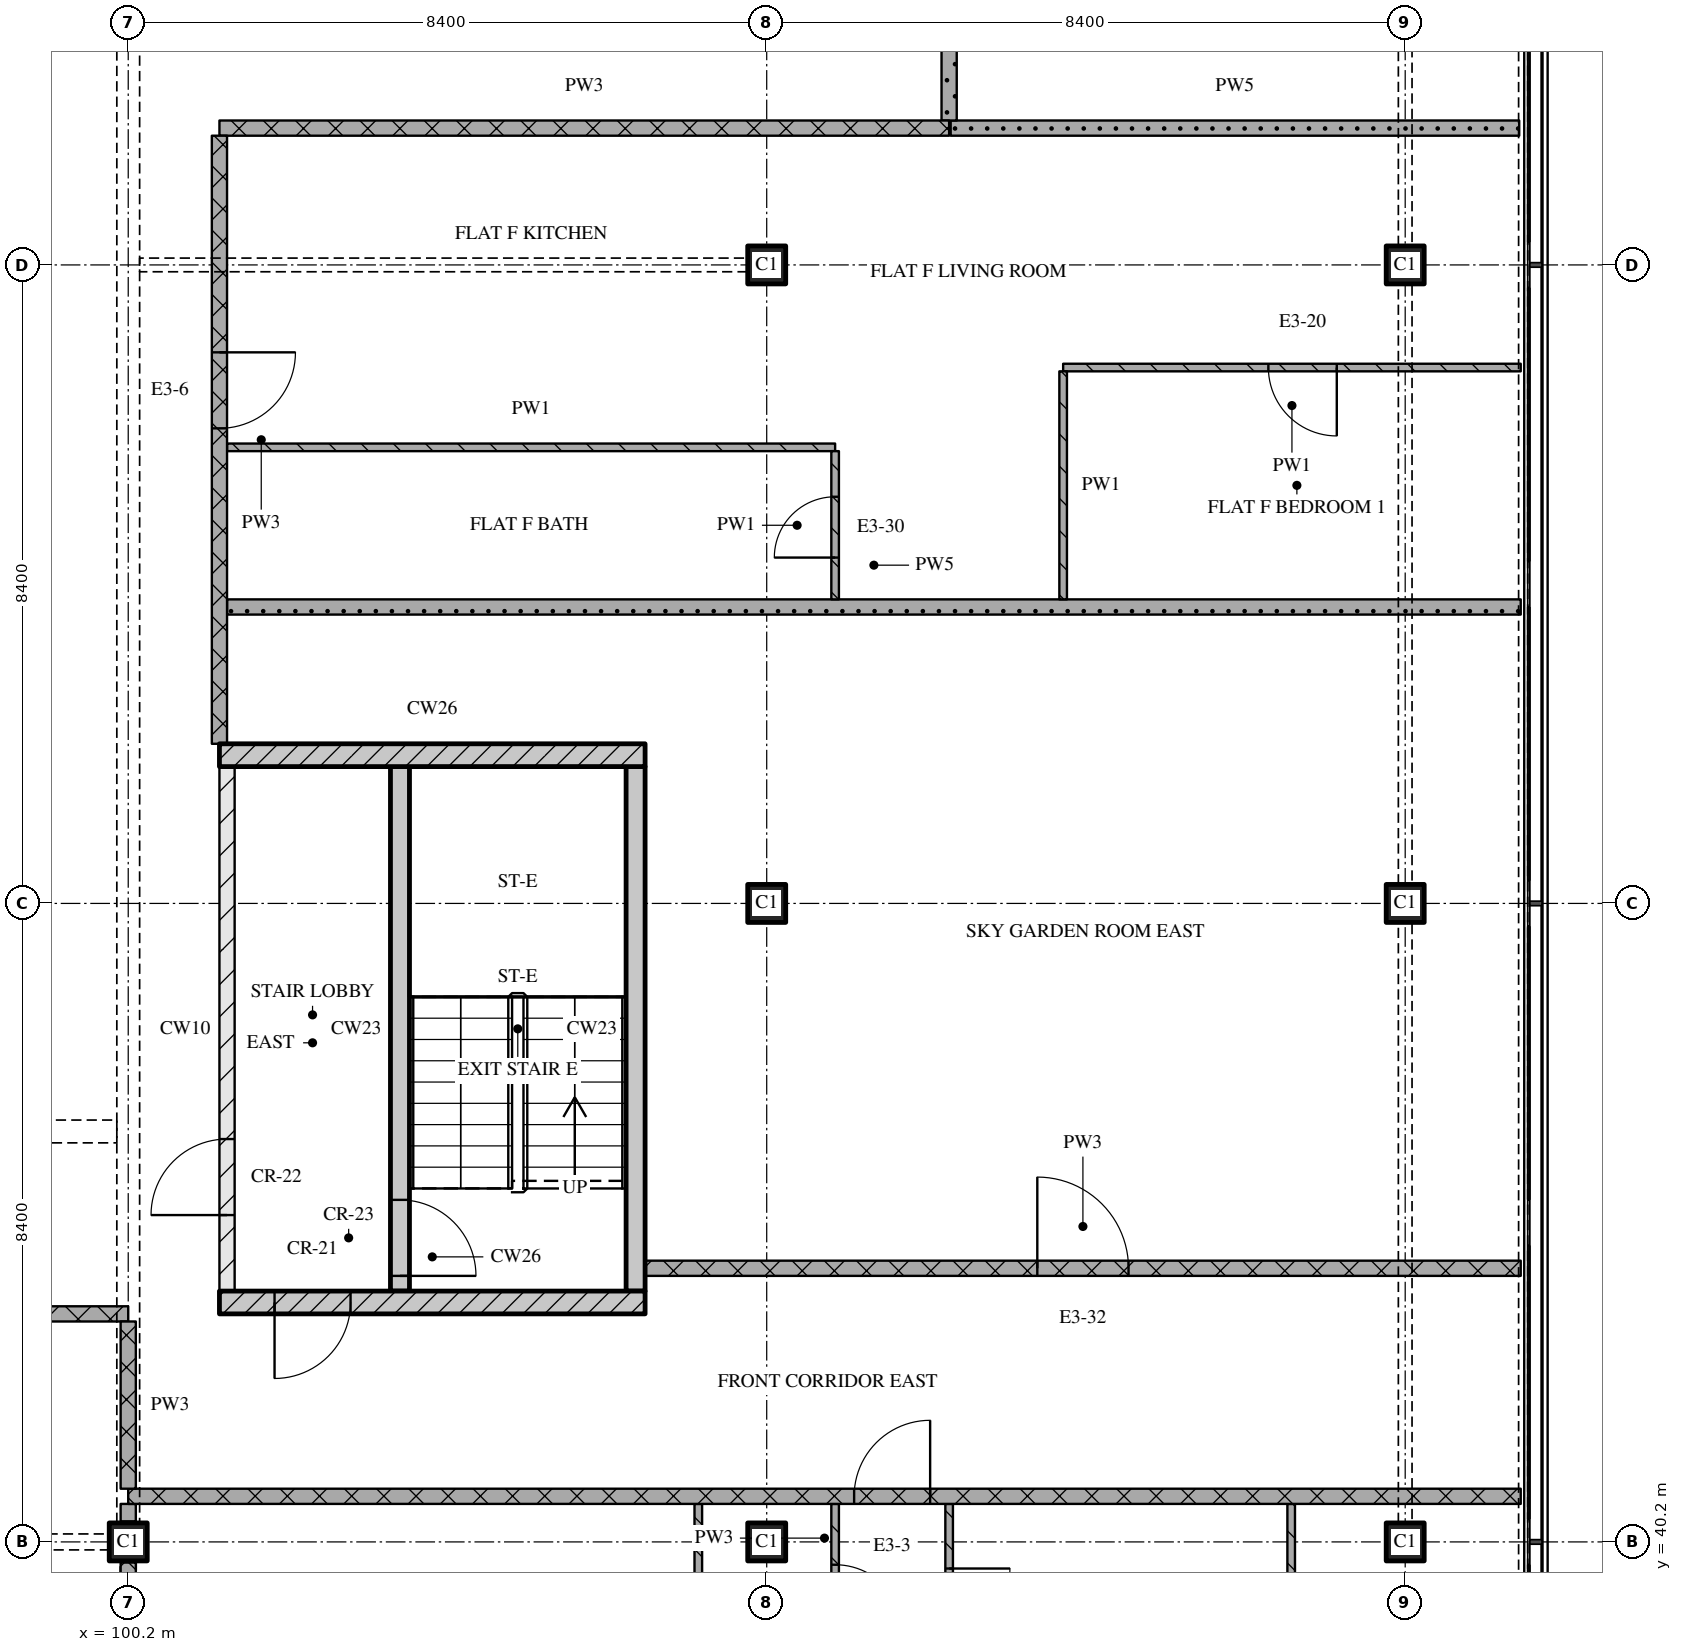
"""IFC4 building model, lengths in metres.
Left out: names, types, materials, properties, quantities, classifications, styles, units other than length and angle.
Written with IfcOpenShell. Run it as: python <this file> out.ifc"""

import sys

from ifc_helpers import new_model, si_unit, direction, frame, frame_2d, origin, origin_2d, place, context, subcontext, project, spatial, rectangle, extrude, element, fill, save


model = new_model("IFC4")
c1 = context("Model", 3, precision=1e-05, world=origin(), true_north=direction((0.0, 1.0)))
c2 = subcontext(c1, "Body", "Model", "MODEL_VIEW")
j1 = project(units=[si_unit("LENGTHUNIT", "METRE"), si_unit("PLANEANGLEUNIT", "RADIAN")], contexts=[c1])
p1 = place(None, origin())
s1 = spatial("IfcSite", under=j1, at=p1, CompositionType="ELEMENT")
p2 = place(p1, origin())
s2 = spatial("IfcBuilding", under=s1, at=p2, CompositionType="ELEMENT")
p3 = place(p2, frame((0.0, 0.0, 274.35)))
s3 = spatial("IfcBuildingStorey", under=s2, at=p3, CompositionType="ELEMENT", Elevation=274.35)
for number, where, z_axis, x_axis in (
    (1, (100.2, 40.2, 0.0), (0.0, 0.0, 1.0), (1.0, 0.0, 0.0)),
    (2, (108.6, 40.2, 0.0), (0.0, 0.0, 1.0), (1.0, 0.0, 0.0)),
    (3, (108.6, 48.6, 0.0), (0.0, 0.0, 1.0), (1.0, 0.0, 0.0)),
    (4, (108.6, 57.0, 0.0), (0.0, 0.0, 1.0), (1.0, 0.0, 0.0)),
    (5, (117.0, 40.2, 0.0), (0.0, 0.0, 1.0), (1.0, 0.0, 0.0)),
    (6, (117.0, 48.6, 0.0), (0.0, 0.0, 1.0), (1.0, 0.0, 0.0)),
    (7, (117.0, 57.0, 0.0), (0.0, 0.0, 1.0), (1.0, 0.0, 0.0)),
):
    element("IfcColumn", number, at=place(p3, frame(where, z_axis=z_axis, x_axis=x_axis)), inside=s3, PredefinedType="COLUMN", context=c2, shape_type="SweptSolid", body=[
        extrude(rectangle(XDim=0.5, YDim=0.5, at=origin_2d()), origin(), (0.0, 0.0, 1.0), 3.6),
    ])
p4 = place(p3, frame((101.4, 43.35, 0.0), z_axis=(0.0, 0.0, 1.0), x_axis=(1.0, 0.0, 0.0)))
e8 = element("IfcWall", 8, at=p4, inside=s3, PredefinedType="SOLIDWALL", context=c2, shape_type="SweptSolid", body=[
    extrude(rectangle(XDim=5.6, YDim=0.3, at=frame_2d((2.8, 0.0))), origin(), (0.0, 0.0, 1.0), 3.32),
])
p5 = place(p4, frame((0.725, 0.0, 0.0)))
e9 = element("IfcOpeningElement", 9, at=p5, cuts=e8, PredefinedType="OPENING", context=c2, shape_type="SweptSolid", body=[
    extrude(rectangle(XDim=1.0, YDim=2.1, at=frame_2d((0.5, 1.05))), frame((0.0, 0.16, 0.0), z_axis=(0.0, -1.0, 0.0), x_axis=(1.0, 0.0, 0.0)), (0.0, 0.0, 1.0), 0.32),
])
p6 = place(p3, frame((101.5, 43.5, 0.0), z_axis=(0.0, 0.0, 1.0), x_axis=(0.0, 1.0, 0.0)))
e10 = element("IfcWall", 10, at=p6, inside=s3, PredefinedType="PARTITIONING", context=c2, shape_type="SweptSolid", body=[
    extrude(rectangle(XDim=6.9, YDim=0.2, at=frame_2d((3.45, 0.0))), origin(), (0.0, 0.0, 1.0), 3.32),
])
p7 = place(p6, frame((1.0, 0.0, 0.0)))
e11 = element("IfcOpeningElement", 11, at=p7, cuts=e10, PredefinedType="OPENING", context=c2, shape_type="SweptSolid", body=[
    extrude(rectangle(XDim=1.0, YDim=2.1, at=frame_2d((0.5, 1.05))), frame((0.0, 0.11, 0.0), z_axis=(0.0, -1.0, 0.0), x_axis=(1.0, 0.0, 0.0)), (0.0, 0.0, 1.0), 0.22),
])
p8 = place(p3, frame((103.775, 43.5, 0.0), z_axis=(0.0, 0.0, 1.0), x_axis=(0.0, 1.0, 0.0)))
e12 = element("IfcWall", 12, at=p8, inside=s3, PredefinedType="SOLIDWALL", context=c2, shape_type="SweptSolid", body=[
    extrude(rectangle(XDim=6.9, YDim=0.25, at=frame_2d((3.45, 0.0))), origin(), (0.0, 0.0, 1.0), 3.32),
])
p9 = place(p8, frame((0.2, 0.0, 0.0)))
e13 = element("IfcOpeningElement", 13, at=p9, cuts=e12, PredefinedType="OPENING", context=c2, shape_type="SweptSolid", body=[
    extrude(rectangle(XDim=1.0, YDim=2.1, at=frame_2d((0.5, 1.05))), frame((0.0, 0.135, 0.0), z_axis=(0.0, -1.0, 0.0), x_axis=(1.0, 0.0, 0.0)), (0.0, 0.0, 1.0), 0.27),
])
p10 = place(p3, frame((106.875, 43.5, 0.0), z_axis=(0.0, 0.0, 1.0), x_axis=(0.0, 1.0, 0.0)))
e14 = element("IfcWall", 14, at=p10, inside=s3, PredefinedType="SOLIDWALL", context=c2, shape_type="SweptSolid", body=[
    extrude(rectangle(XDim=6.9, YDim=0.25, at=frame_2d((3.45, 0.0))), origin(), (0.0, 0.0, 1.0), 3.32),
])
p11 = place(p3, frame((101.4, 50.55, 0.0), z_axis=(0.0, 0.0, 1.0), x_axis=(1.0, 0.0, 0.0)))
e15 = element("IfcWall", 15, at=p11, inside=s3, PredefinedType="SOLIDWALL", context=c2, shape_type="SweptSolid", body=[
    extrude(rectangle(XDim=5.6, YDim=0.3, at=frame_2d((2.8, 0.0))), origin(), (0.0, 0.0, 1.0), 3.32),
])
p12 = place(p3, frame((118.52, 40.8, 0.0), z_axis=(0.0, 0.0, 1.0), x_axis=(-1.0, 0.0, 0.0)))
e16 = element("IfcWall", 16, at=p12, inside=s3, PredefinedType="PARTITIONING", context=c2, shape_type="SweptSolid", body=[
    extrude(rectangle(XDim=18.32, YDim=0.2, at=frame_2d((9.16, 0.0))), origin(), (0.0, 0.0, 1.0), 3.32),
])
p13 = place(p12, frame((7.77, 0.0, 0.0)))
e17 = element("IfcOpeningElement", 17, at=p13, cuts=e16, PredefinedType="OPENING", context=c2, shape_type="SweptSolid", body=[
    extrude(rectangle(XDim=1.0, YDim=2.1, at=frame_2d((0.5, 1.05))), frame((0.0, 0.11, 0.0), z_axis=(0.0, -1.0, 0.0), x_axis=(1.0, 0.0, 0.0)), (0.0, 0.0, 1.0), 0.22),
])
p14 = place(p3, frame((100.2, 43.2, 0.0), z_axis=(0.0, 0.0, 1.0), x_axis=(-1.0, 0.0, 0.0)))
e18 = element("IfcWall", 18, at=p14, inside=s3, PredefinedType="PARTITIONING", context=c2, shape_type="SweptSolid", body=[
    extrude(rectangle(XDim=25.2, YDim=0.2, at=frame_2d((12.6, 0.0))), origin(), (0.0, 0.0, 1.0), 3.32),
])
p15 = place(p14, frame((17.35, 0.0, 0.0)))
e19 = element("IfcOpeningElement", 19, at=p15, cuts=e18, PredefinedType="OPENING", context=c2, shape_type="SweptSolid", body=[
    extrude(rectangle(XDim=1.0, YDim=2.1, at=frame_2d((0.5, 1.05))), frame((0.0, 0.11, 0.0), z_axis=(0.0, -1.0, 0.0), x_axis=(1.0, 0.0, 0.0)), (0.0, 0.0, 1.0), 0.22),
])
p16 = place(p3, frame((107.0, 43.8, 0.0), z_axis=(0.0, 0.0, 1.0), x_axis=(1.0, 0.0, 0.0)))
e20 = element("IfcWall", 20, at=p16, inside=s3, PredefinedType="PARTITIONING", context=c2, shape_type="SweptSolid", body=[
    extrude(rectangle(XDim=11.52, YDim=0.2, at=frame_2d((5.76, 0.0))), origin(), (0.0, 0.0, 1.0), 3.32),
])
p17 = place(p16, frame((5.16, 0.0, 0.0)))
e21 = element("IfcOpeningElement", 21, at=p17, cuts=e20, PredefinedType="OPENING", context=c2, shape_type="SweptSolid", body=[
    extrude(rectangle(XDim=1.2, YDim=2.1, at=frame_2d((0.6, 1.05))), frame((0.0, 0.11, 0.0), z_axis=(0.0, -1.0, 0.0), x_axis=(1.0, 0.0, 0.0)), (0.0, 0.0, 1.0), 0.22),
])
p18 = place(p3, frame((101.5, 52.5, 0.0), z_axis=(0.0, 0.0, 1.0), x_axis=(1.0, 0.0, 0.0)))
e22 = element("IfcWall", 22, at=p18, inside=s3, PredefinedType="PARTITIONING", context=c2, shape_type="SweptSolid", body=[
    extrude(rectangle(XDim=17.02, YDim=0.2, at=frame_2d((8.51, 0.0))), origin(), (0.0, 0.0, 1.0), 3.32),
])
p19 = place(p3, frame((101.5, 54.6, 0.0), z_axis=(0.0, 0.0, 1.0), x_axis=(1.0, 0.0, 0.0)))
e23 = element("IfcWall", 23, at=p19, inside=s3, PredefinedType="PARTITIONING", context=c2, shape_type="SweptSolid", body=[
    extrude(rectangle(XDim=8.0, YDim=0.1, at=frame_2d((4.0, 0.0))), origin(), (0.0, 0.0, 1.0), 3.32),
])
p20 = place(p3, frame((118.52, 55.65, 0.0), z_axis=(0.0, 0.0, 1.0), x_axis=(-1.0, 0.0, 0.0)))
e24 = element("IfcWall", 24, at=p20, inside=s3, PredefinedType="PARTITIONING", context=c2, shape_type="SweptSolid", body=[
    extrude(rectangle(XDim=6.02, YDim=0.1, at=frame_2d((3.01, 0.0))), origin(), (0.0, 0.0, 1.0), 3.32),
])
p21 = place(p20, frame((2.42, 0.0, 0.0)))
e25 = element("IfcOpeningElement", 25, at=p21, cuts=e24, PredefinedType="OPENING", context=c2, shape_type="SweptSolid", body=[
    extrude(rectangle(XDim=0.9, YDim=2.1, at=frame_2d((0.45, 1.05))), frame((0.0, 0.06, 0.0), z_axis=(0.0, -1.0, 0.0), x_axis=(1.0, 0.0, 0.0)), (0.0, 0.0, 1.0), 0.12),
])
p22 = place(p3, frame((101.4, 58.8, 0.0), z_axis=(0.0, 0.0, 1.0), x_axis=(1.0, 0.0, 0.0)))
e26 = element("IfcWall", 26, at=p22, inside=s3, PredefinedType="PARTITIONING", context=c2, shape_type="SweptSolid", body=[
    extrude(rectangle(XDim=9.6, YDim=0.2, at=frame_2d((4.8, 0.0))), origin(), (0.0, 0.0, 1.0), 3.32),
])
p23 = place(p3, frame((111.02, 58.8, 0.0), z_axis=(0.0, 0.0, 1.0), x_axis=(1.0, 0.0, 0.0)))
e27 = element("IfcWall", 27, at=p23, inside=s3, PredefinedType="PARTITIONING", context=c2, shape_type="SweptSolid", body=[
    extrude(rectangle(XDim=7.48, YDim=0.2, at=frame_2d((3.74, 0.0))), origin(), (0.0, 0.0, 1.0), 3.32),
])
p24 = place(p3, frame((100.2, 43.1, 0.0), z_axis=(0.0, 0.0, 1.0), x_axis=(0.0, -1.0, 0.0)))
e28 = element("IfcWall", 28, at=p24, inside=s3, PredefinedType="PARTITIONING", context=c2, shape_type="SweptSolid", body=[
    extrude(rectangle(XDim=2.2, YDim=0.2, at=frame_2d((1.1, 0.0))), origin(), (0.0, 0.0, 1.0), 2.53),
])
p25 = place(p3, frame((100.2, 39.93, 0.0), z_axis=(0.0, 0.0, 1.0), x_axis=(0.0, -1.0, 0.0)))
e29 = element("IfcWall", 29, at=p25, inside=s3, PredefinedType="PARTITIONING", context=c2, shape_type="SweptSolid", body=[
    extrude(rectangle(XDim=7.86, YDim=0.2, at=frame_2d((3.93, 0.0))), origin(), (0.0, 0.0, 1.0), 2.77),
])
p26 = place(p3, frame((100.2, 40.7, 0.0), z_axis=(0.0, 0.0, 1.0), x_axis=(0.0, -1.0, 0.0)))
e30 = element("IfcWall", 30, at=p26, inside=s3, PredefinedType="PARTITIONING", context=c2, shape_type="SweptSolid", body=[
    extrude(rectangle(XDim=0.23, YDim=0.2, at=frame_2d((0.115, 0.0))), origin(), (0.0, 0.0, 1.0), 3.32),
])
p27 = place(p3, frame((101.4, 58.7, 0.0), z_axis=(0.0, 0.0, 1.0), x_axis=(0.0, -1.0, 0.0)))
e31 = element("IfcWall", 31, at=p27, inside=s3, PredefinedType="PARTITIONING", context=c2, shape_type="SweptSolid", body=[
    extrude(rectangle(XDim=8.0, YDim=0.2, at=frame_2d((4.0, 0.0))), origin(), (0.0, 0.0, 1.0), 3.32),
])
p28 = place(p27, frame((2.85, 0.0, 0.0)))
e32 = element("IfcOpeningElement", 32, at=p28, cuts=e31, PredefinedType="OPENING", context=c2, shape_type="SweptSolid", body=[
    extrude(rectangle(XDim=1.0, YDim=2.1, at=frame_2d((0.5, 1.05))), frame((0.0, 0.11, 0.0), z_axis=(0.0, -1.0, 0.0), x_axis=(1.0, 0.0, 0.0)), (0.0, 0.0, 1.0), 0.22),
])
p29 = place(p3, frame((107.7, 40.7, 0.0), z_axis=(0.0, 0.0, 1.0), x_axis=(0.0, -1.0, 0.0)))
e33 = element("IfcWall", 33, at=p29, inside=s3, PredefinedType="PARTITIONING", context=c2, shape_type="SweptSolid", body=[
    extrude(rectangle(XDim=2.55, YDim=0.1, at=frame_2d((1.275, 0.0))), origin(), (0.0, 0.0, 1.0), 3.32),
])
p30 = place(p3, frame((109.5, 38.15, 0.0), z_axis=(0.0, 0.0, 1.0), x_axis=(0.0, 1.0, 0.0)))
e34 = element("IfcWall", 34, at=p30, inside=s3, PredefinedType="PARTITIONING", context=c2, shape_type="SweptSolid", body=[
    extrude(rectangle(XDim=2.55, YDim=0.1, at=frame_2d((1.275, 0.0))), origin(), (0.0, 0.0, 1.0), 3.32),
])
p31 = place(p30, frame((0.85, 0.0, 0.0)))
e35 = element("IfcOpeningElement", 35, at=p31, cuts=e34, PredefinedType="OPENING", context=c2, shape_type="SweptSolid", body=[
    extrude(rectangle(XDim=0.9, YDim=2.1, at=frame_2d((0.45, 1.05))), frame((0.0, 0.06, 0.0), z_axis=(0.0, -1.0, 0.0), x_axis=(1.0, 0.0, 0.0)), (0.0, 0.0, 1.0), 0.12),
])
p32 = place(p3, frame((109.5, 52.6, 0.0), z_axis=(0.0, 0.0, 1.0), x_axis=(0.0, 1.0, 0.0)))
e36 = element("IfcWall", 36, at=p32, inside=s3, PredefinedType="PARTITIONING", context=c2, shape_type="SweptSolid", body=[
    extrude(rectangle(XDim=1.95, YDim=0.1, at=frame_2d((0.975, 0.0))), origin(), (0.0, 0.0, 1.0), 3.32),
])
p33 = place(p32, frame((0.55, 0.0, 0.0)))
e37 = element("IfcOpeningElement", 37, at=p33, cuts=e36, PredefinedType="OPENING", context=c2, shape_type="SweptSolid", body=[
    extrude(rectangle(XDim=0.8, YDim=2.1, at=frame_2d((0.4, 1.05))), frame((0.0, 0.06, 0.0), z_axis=(0.0, -1.0, 0.0), x_axis=(1.0, 0.0, 0.0)), (0.0, 0.0, 1.0), 0.12),
])
p34 = place(p3, frame((111.0, 61.1, 0.0), z_axis=(0.0, 0.0, 1.0), x_axis=(0.0, -1.0, 0.0)))
e38 = element("IfcWall", 38, at=p34, inside=s3, PredefinedType="PARTITIONING", context=c2, shape_type="SweptSolid", body=[
    extrude(rectangle(XDim=2.2, YDim=0.2, at=frame_2d((1.1, 0.0))), origin(), (0.0, 0.0, 1.0), 3.32),
])
p35 = place(p3, frame((111.0, 40.7, 0.0), z_axis=(0.0, 0.0, 1.0), x_axis=(0.0, -1.0, 0.0)))
e39 = element("IfcWall", 39, at=p35, inside=s3, PredefinedType="PARTITIONING", context=c2, shape_type="SweptSolid", body=[
    extrude(rectangle(XDim=2.55, YDim=0.1, at=frame_2d((1.275, 0.0))), origin(), (0.0, 0.0, 1.0), 3.32),
])
p36 = place(p35, frame((0.85, 0.0, 0.0)))
e40 = element("IfcOpeningElement", 40, at=p36, cuts=e39, PredefinedType="OPENING", context=c2, shape_type="SweptSolid", body=[
    extrude(rectangle(XDim=0.8, YDim=2.1, at=frame_2d((0.4, 1.05))), frame((0.0, 0.06, 0.0), z_axis=(0.0, -1.0, 0.0), x_axis=(1.0, 0.0, 0.0)), (0.0, 0.0, 1.0), 0.12),
])
p37 = place(p3, frame((112.5, 55.6, 0.0), z_axis=(0.0, 0.0, 1.0), x_axis=(0.0, -1.0, 0.0)))
e41 = element("IfcWall", 41, at=p37, inside=s3, PredefinedType="PARTITIONING", context=c2, shape_type="SweptSolid", body=[
    extrude(rectangle(XDim=3.0, YDim=0.1, at=frame_2d((1.5, 0.0))), origin(), (0.0, 0.0, 1.0), 3.32),
])
p38 = place(p3, frame((115.5, 40.7, 0.0), z_axis=(0.0, 0.0, 1.0), x_axis=(0.0, -1.0, 0.0)))
e42 = element("IfcWall", 42, at=p38, inside=s3, PredefinedType="PARTITIONING", context=c2, shape_type="SweptSolid", body=[
    extrude(rectangle(XDim=2.55, YDim=0.1, at=frame_2d((1.275, 0.0))), origin(), (0.0, 0.0, 1.0), 3.32),
])
p39 = place(p5, origin())
e43 = element("IfcDoor", 43, at=p39, inside=s3, OperationType="SINGLE_SWING_RIGHT", PredefinedType="DOOR", context=c2, shape_type="SweptSolid", body=[
    extrude(rectangle(XDim=1.0, YDim=2.1, at=frame_2d((0.5, 1.05))), frame((0.0, 0.025, 0.0), z_axis=(0.0, -1.0, 0.0), x_axis=(1.0, 0.0, 0.0)), (0.0, 0.0, 1.0), 0.05),
])
fill(e9, e43)
p40 = place(p9, origin())
e44 = element("IfcDoor", 44, at=p40, inside=s3, OperationType="SINGLE_SWING_RIGHT", PredefinedType="DOOR", context=c2, shape_type="SweptSolid", body=[
    extrude(rectangle(XDim=1.0, YDim=2.1, at=frame_2d((0.5, 1.05))), frame((0.0, 0.025, 0.0), z_axis=(0.0, -1.0, 0.0), x_axis=(1.0, 0.0, 0.0)), (0.0, 0.0, 1.0), 0.05),
])
fill(e13, e44)
p41 = place(p7, origin())
e45 = element("IfcDoor", 45, at=p41, inside=s3, OperationType="SINGLE_SWING_LEFT", PredefinedType="DOOR", context=c2, shape_type="SweptSolid", body=[
    extrude(rectangle(XDim=1.0, YDim=2.1, at=frame_2d((0.5, 1.05))), frame((0.0, 0.025, 0.0), z_axis=(0.0, -1.0, 0.0), x_axis=(1.0, 0.0, 0.0)), (0.0, 0.0, 1.0), 0.05),
])
fill(e11, e45)
p42 = place(p13, origin())
e46 = element("IfcDoor", 46, at=p42, inside=s3, OperationType="SINGLE_SWING_RIGHT", PredefinedType="DOOR", context=c2, shape_type="SweptSolid", body=[
    extrude(rectangle(XDim=1.0, YDim=2.1, at=frame_2d((0.5, 1.05))), frame((0.0, 0.025, 0.0), z_axis=(0.0, -1.0, 0.0), x_axis=(1.0, 0.0, 0.0)), (0.0, 0.0, 1.0), 0.05),
])
fill(e17, e46)
p43 = place(p17, origin())
e47 = element("IfcDoor", 47, at=p43, inside=s3, OperationType="SINGLE_SWING_LEFT", PredefinedType="DOOR", context=c2, shape_type="SweptSolid", body=[
    extrude(rectangle(XDim=1.2, YDim=2.1, at=frame_2d((0.6, 1.05))), frame((0.0, 0.025, 0.0), z_axis=(0.0, -1.0, 0.0), x_axis=(1.0, 0.0, 0.0)), (0.0, 0.0, 1.0), 0.05),
])
fill(e21, e47)
p44 = place(p21, origin())
e48 = element("IfcDoor", 48, at=p44, inside=s3, OperationType="SINGLE_SWING_LEFT", PredefinedType="DOOR", context=c2, shape_type="SweptSolid", body=[
    extrude(rectangle(XDim=0.9, YDim=2.1, at=frame_2d((0.45, 1.05))), frame((0.0, 0.025, 0.0), z_axis=(0.0, -1.0, 0.0), x_axis=(1.0, 0.0, 0.0)), (0.0, 0.0, 1.0), 0.05),
])
fill(e25, e48)
p45 = place(p28, origin())
e49 = element("IfcDoor", 49, at=p45, inside=s3, OperationType="SINGLE_SWING_LEFT", PredefinedType="DOOR", context=c2, shape_type="SweptSolid", body=[
    extrude(rectangle(XDim=1.0, YDim=2.1, at=frame_2d((0.5, 1.05))), frame((0.0, 0.025, 0.0), z_axis=(0.0, -1.0, 0.0), x_axis=(1.0, 0.0, 0.0)), (0.0, 0.0, 1.0), 0.05),
])
fill(e32, e49)
p46 = place(p31, origin())
e50 = element("IfcDoor", 50, at=p46, inside=s3, OperationType="SINGLE_SWING_RIGHT", PredefinedType="DOOR", context=c2, shape_type="SweptSolid", body=[
    extrude(rectangle(XDim=0.9, YDim=2.1, at=frame_2d((0.45, 1.05))), frame((0.0, 0.025, 0.0), z_axis=(0.0, -1.0, 0.0), x_axis=(1.0, 0.0, 0.0)), (0.0, 0.0, 1.0), 0.05),
])
fill(e35, e50)
p47 = place(p33, origin())
e51 = element("IfcDoor", 51, at=p47, inside=s3, OperationType="SINGLE_SWING_LEFT", PredefinedType="DOOR", context=c2, shape_type="SweptSolid", body=[
    extrude(rectangle(XDim=0.8, YDim=2.1, at=frame_2d((0.4, 1.05))), frame((0.0, 0.025, 0.0), z_axis=(0.0, -1.0, 0.0), x_axis=(1.0, 0.0, 0.0)), (0.0, 0.0, 1.0), 0.05),
])
fill(e37, e51)
p48 = place(p36, origin())
e52 = element("IfcDoor", 52, at=p48, inside=s3, OperationType="SINGLE_SWING_LEFT", PredefinedType="DOOR", context=c2, shape_type="SweptSolid", body=[
    extrude(rectangle(XDim=0.8, YDim=2.1, at=frame_2d((0.4, 1.05))), frame((0.0, 0.025, 0.0), z_axis=(0.0, -1.0, 0.0), x_axis=(1.0, 0.0, 0.0)), (0.0, 0.0, 1.0), 0.05),
])
fill(e40, e52)
save(model, sys.argv[1])
